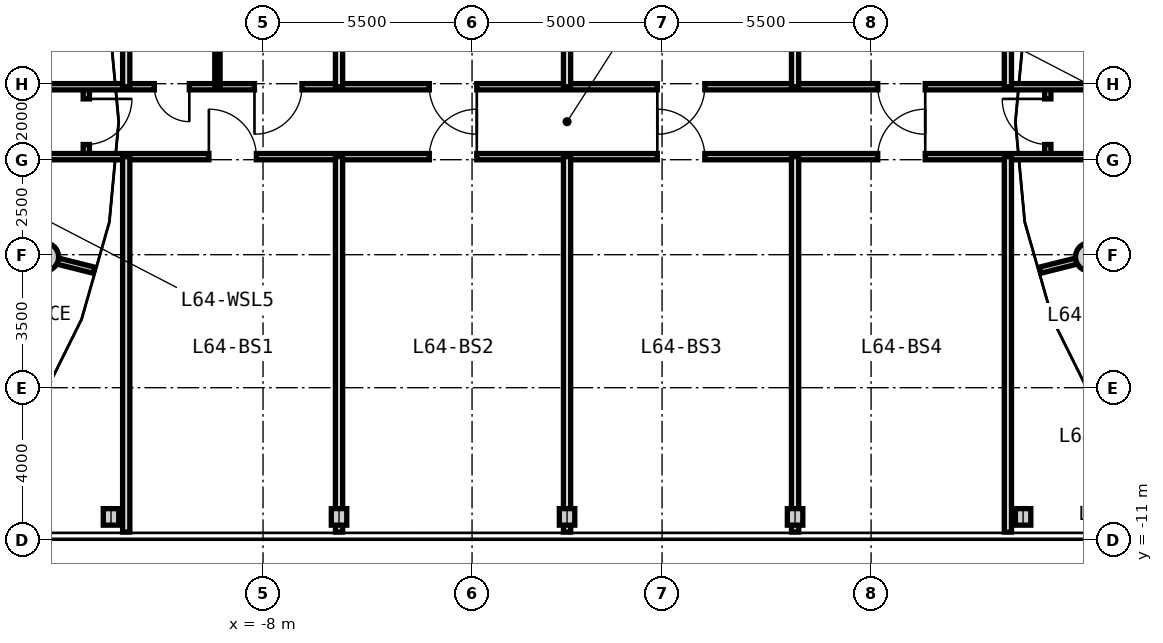
"""IFC4 building model, lengths in metres.
Left out: names, types, materials, properties, quantities, classifications, styles, units other than length and angle.
Written with IfcOpenShell. Run it as: python <this file> out.ifc"""

import sys

from ifc_helpers import new_model, si_unit, direction, frame, frame_2d, origin, origin_2d, place, context, subcontext, project, spatial, rectangle, circle, i_section, extrude, source, transform, mapped, element, fill, save


model = new_model("IFC4")
c1 = context("Model", 3, precision=1e-05, world=origin(), true_north=direction((0.0, 1.0)))
c2 = subcontext(c1, "Body", "Model", "MODEL_VIEW")
j1 = project(units=[si_unit("LENGTHUNIT", "METRE"), si_unit("PLANEANGLEUNIT", "RADIAN")], contexts=[c1])
p1 = place(None, origin())
s1 = spatial("IfcSite", under=j1, at=p1, CompositionType="ELEMENT")
p2 = place(p1, origin())
s2 = spatial("IfcBuilding", under=s1, at=p2, CompositionType="ELEMENT")
p3 = place(p2, frame((0.0, 0.0, 207.8)))
s3 = spatial("IfcBuildingStorey", under=s2, at=p3, CompositionType="ELEMENT", Elevation=207.8)
m1 = source(origin(), c2, "Body", "SweptSolid", [
    extrude(circle(Radius=0.375, at=origin_2d()), origin(), (0.0, 0.0, 1.0), 3.05),
])
for number, where, z_axis, x_axis in (
    (1, (-13.753, -3.559, 0.0), (0.0, 0.0, 1.0), (1.0, 0.0, 0.0)),
    (2, (13.753, -3.559, 0.0), (0.0, 0.0, 1.0), (1.0, 0.0, 0.0)),
):
    element("IfcColumn", number, at=place(p3, frame(where, z_axis=z_axis, x_axis=x_axis)), inside=s3, PredefinedType="COLUMN", context=c2, shape_type="MappedRepresentation", body=[
        mapped(m1, transform((0.0, 0.0, 0.0), x_axis=(1.0, 0.0, 0.0), y_axis=(0.0, 1.0, 0.0), z_axis=(0.0, 0.0, 1.0), scale=1.0)),
    ])
m2 = source(origin(), c2, "Body", "SweptSolid", [
    extrude(i_section(OverallWidth=0.407, OverallDepth=0.435, WebThickness=0.024, FlangeThickness=0.039, FilletRadius=0.015, at=origin_2d()), origin(), (0.0, 0.0, 1.0), 3.05),
])
for number, where, z_axis, x_axis in (
    (3, (-12.0, -10.4, 0.0), (0.0, 0.0, 1.0), (1.0, 0.0, 0.0)),
    (4, (-6.0, -10.4, 0.0), (0.0, 0.0, 1.0), (1.0, 0.0, 0.0)),
    (5, (0.0, -10.4, 0.0), (0.0, 0.0, 1.0), (1.0, 0.0, 0.0)),
    (6, (6.0, -10.4, 0.0), (0.0, 0.0, 1.0), (1.0, 0.0, 0.0)),
    (7, (12.0, -10.4, 0.0), (0.0, 0.0, 1.0), (1.0, 0.0, 0.0)),
):
    element("IfcColumn", number, at=place(p3, frame(where, z_axis=z_axis, x_axis=x_axis)), inside=s3, PredefinedType="COLUMN", context=c2, shape_type="MappedRepresentation", body=[
        mapped(m2, transform((0.0, 0.0, 0.0), x_axis=(1.0, 0.0, 0.0), y_axis=(0.0, 1.0, 0.0), z_axis=(0.0, 0.0, 1.0), scale=1.0)),
    ])
m3 = source(origin(), c2, "Body", "SweptSolid", [
    extrude(rectangle(XDim=6.157, YDim=0.165, at=frame_2d((3.079, 0.0))), origin(), (0.0, 0.0, 1.0), 2.345),
])
for number, where, z_axis, x_axis in (
    (8, (-18.42, -2.407, 0.0), (0.0, 0.0, 1.0), (0.97, -0.244, 0.0)),
    (9, (18.42, -2.407, 0.0), (0.0, 0.0, 1.0), (-0.97, -0.244, 0.0)),
):
    element("IfcWall", number, at=place(p3, frame(where, z_axis=z_axis, x_axis=x_axis)), inside=s3, PredefinedType="PARTITIONING", context=c2, shape_type="MappedRepresentation", body=[
        mapped(m3, transform((0.0, 0.0, 0.0), x_axis=(1.0, 0.0, 0.0), y_axis=(0.0, 1.0, 0.0), z_axis=(0.0, 0.0, 1.0), scale=1.0)),
    ])
m4 = source(origin(), c2, "Body", "SweptSolid", [
    extrude(rectangle(XDim=1.84, YDim=0.165, at=frame_2d((0.92, 0.0))), origin(), (0.0, 0.0, 1.0), 2.745),
])
p4 = place(p3, frame((-12.65, -0.92, 0.0), z_axis=(0.0, 0.0, 1.0), x_axis=(0.0, 1.0, 0.0)))
e10 = element("IfcWall", 10, at=p4, inside=s3, PredefinedType="PARTITIONING", context=c2, shape_type="MappedRepresentation", body=[
    mapped(m4, transform((0.0, 0.0, 0.0), x_axis=(1.0, 0.0, 0.0), y_axis=(0.0, 1.0, 0.0), z_axis=(0.0, 0.0, 1.0), scale=1.0)),
])
p5 = place(p4, frame((0.32, 0.0, 0.0)))
e11 = element("IfcOpeningElement", 11, at=p5, cuts=e10, PredefinedType="OPENING", context=c2, shape_type="SweptSolid", body=[
    extrude(rectangle(XDim=1.2, YDim=2.15, at=frame_2d((0.6, 1.075))), frame((0.0, 0.093, 0.0), z_axis=(0.0, -1.0, 0.0), x_axis=(1.0, 0.0, 0.0)), (0.0, 0.0, 1.0), 0.185),
])
p6 = place(p3, frame((12.65, -0.92, 0.0), z_axis=(0.0, 0.0, 1.0), x_axis=(0.0, 1.0, 0.0)))
e12 = element("IfcWall", 12, at=p6, inside=s3, PredefinedType="PARTITIONING", context=c2, shape_type="MappedRepresentation", body=[
    mapped(m4, transform((0.0, 0.0, 0.0), x_axis=(1.0, 0.0, 0.0), y_axis=(0.0, 1.0, 0.0), z_axis=(0.0, 0.0, 1.0), scale=1.0)),
])
p7 = place(p6, frame((0.32, 0.0, 0.0)))
e13 = element("IfcOpeningElement", 13, at=p7, cuts=e12, PredefinedType="OPENING", context=c2, shape_type="SweptSolid", body=[
    extrude(rectangle(XDim=1.2, YDim=2.15, at=frame_2d((0.6, 1.075))), frame((0.0, 0.093, 0.0), z_axis=(0.0, -1.0, 0.0), x_axis=(1.0, 0.0, 0.0)), (0.0, 0.0, 1.0), 0.185),
])
m5 = source(origin(), c2, "Body", "SweptSolid", [
    extrude(rectangle(XDim=37.0, YDim=0.165, at=frame_2d((18.5, 0.0))), origin(), (0.0, 0.0, 1.0), 2.745),
])
p8 = place(p3, frame((-18.5, -0.92, 0.0), z_axis=(0.0, 0.0, 1.0), x_axis=(1.0, 0.0, 0.0)))
e14 = element("IfcWall", 14, at=p8, inside=s3, PredefinedType="PARTITIONING", context=c2, shape_type="MappedRepresentation", body=[
    mapped(m5, transform((0.0, 0.0, 0.0), x_axis=(1.0, 0.0, 0.0), y_axis=(0.0, 1.0, 0.0), z_axis=(0.0, 0.0, 1.0), scale=1.0)),
])
p9 = place(p8, frame((2.662, 0.0, 0.0)))
e15 = element("IfcOpeningElement", 15, at=p9, cuts=e14, PredefinedType="OPENING", context=c2, shape_type="SweptSolid", body=[
    extrude(rectangle(XDim=0.95, YDim=2.1, at=frame_2d((0.475, 1.05))), frame((0.0, 0.093, 0.0), z_axis=(0.0, -1.0, 0.0), x_axis=(1.0, 0.0, 0.0)), (0.0, 0.0, 1.0), 0.185),
])
p10 = place(p8, frame((33.388, 0.0, 0.0)))
e16 = element("IfcOpeningElement", 16, at=p10, cuts=e14, PredefinedType="OPENING", context=c2, shape_type="SweptSolid", body=[
    extrude(rectangle(XDim=0.95, YDim=2.1, at=frame_2d((0.475, 1.05))), frame((0.0, 0.093, 0.0), z_axis=(0.0, -1.0, 0.0), x_axis=(1.0, 0.0, 0.0)), (0.0, 0.0, 1.0), 0.185),
])
p11 = place(p8, frame((9.075, 0.0, 0.0)))
e17 = element("IfcOpeningElement", 17, at=p11, cuts=e14, PredefinedType="OPENING", context=c2, shape_type="SweptSolid", body=[
    extrude(rectangle(XDim=1.25, YDim=2.2, at=frame_2d((0.625, 1.1))), frame((0.0, 0.093, 0.0), z_axis=(0.0, -1.0, 0.0), x_axis=(1.0, 0.0, 0.0)), (0.0, 0.0, 1.0), 0.185),
])
p12 = place(p8, frame((14.875, 0.0, 0.0)))
e18 = element("IfcOpeningElement", 18, at=p12, cuts=e14, PredefinedType="OPENING", context=c2, shape_type="SweptSolid", body=[
    extrude(rectangle(XDim=1.25, YDim=2.2, at=frame_2d((0.625, 1.1))), frame((0.0, 0.093, 0.0), z_axis=(0.0, -1.0, 0.0), x_axis=(1.0, 0.0, 0.0)), (0.0, 0.0, 1.0), 0.185),
])
p13 = place(p8, frame((20.875, 0.0, 0.0)))
e19 = element("IfcOpeningElement", 19, at=p13, cuts=e14, PredefinedType="OPENING", context=c2, shape_type="SweptSolid", body=[
    extrude(rectangle(XDim=1.25, YDim=2.2, at=frame_2d((0.625, 1.1))), frame((0.0, 0.093, 0.0), z_axis=(0.0, -1.0, 0.0), x_axis=(1.0, 0.0, 0.0)), (0.0, 0.0, 1.0), 0.185),
])
p14 = place(p8, frame((26.675, 0.0, 0.0)))
e20 = element("IfcOpeningElement", 20, at=p14, cuts=e14, PredefinedType="OPENING", context=c2, shape_type="SweptSolid", body=[
    extrude(rectangle(XDim=1.25, YDim=2.2, at=frame_2d((0.625, 1.1))), frame((0.0, 0.093, 0.0), z_axis=(0.0, -1.0, 0.0), x_axis=(1.0, 0.0, 0.0)), (0.0, 0.0, 1.0), 0.185),
])
p15 = place(p3, frame((-18.5, 0.92, 0.0), z_axis=(0.0, 0.0, 1.0), x_axis=(1.0, 0.0, 0.0)))
e21 = element("IfcWall", 21, at=p15, inside=s3, PredefinedType="PARTITIONING", context=c2, shape_type="MappedRepresentation", body=[
    mapped(m5, transform((0.0, 0.0, 0.0), x_axis=(1.0, 0.0, 0.0), y_axis=(0.0, 1.0, 0.0), z_axis=(0.0, 0.0, 1.0), scale=1.0)),
])
p16 = place(p15, frame((2.662, 0.0, 0.0)))
e22 = element("IfcOpeningElement", 22, at=p16, cuts=e21, PredefinedType="OPENING", context=c2, shape_type="SweptSolid", body=[
    extrude(rectangle(XDim=0.95, YDim=2.1, at=frame_2d((0.475, 1.05))), frame((0.0, 0.093, 0.0), z_axis=(0.0, -1.0, 0.0), x_axis=(1.0, 0.0, 0.0)), (0.0, 0.0, 1.0), 0.185),
])
p17 = place(p15, frame((33.388, 0.0, 0.0)))
e23 = element("IfcOpeningElement", 23, at=p17, cuts=e21, PredefinedType="OPENING", context=c2, shape_type="SweptSolid", body=[
    extrude(rectangle(XDim=0.95, YDim=2.1, at=frame_2d((0.475, 1.05))), frame((0.0, 0.093, 0.0), z_axis=(0.0, -1.0, 0.0), x_axis=(1.0, 0.0, 0.0)), (0.0, 0.0, 1.0), 0.185),
])
p18 = place(p15, frame((7.64, 0.0, 0.0)))
e24 = element("IfcOpeningElement", 24, at=p18, cuts=e21, PredefinedType="OPENING", context=c2, shape_type="SweptSolid", body=[
    extrude(rectangle(XDim=0.92, YDim=2.1, at=frame_2d((0.46, 1.05))), frame((0.0, 0.093, 0.0), z_axis=(0.0, -1.0, 0.0), x_axis=(1.0, 0.0, 0.0)), (0.0, 0.0, 1.0), 0.185),
])
p19 = place(p15, frame((10.275, 0.0, 0.0)))
e25 = element("IfcOpeningElement", 25, at=p19, cuts=e21, PredefinedType="OPENING", context=c2, shape_type="SweptSolid", body=[
    extrude(rectangle(XDim=1.25, YDim=2.2, at=frame_2d((0.625, 1.1))), frame((0.0, 0.093, 0.0), z_axis=(0.0, -1.0, 0.0), x_axis=(1.0, 0.0, 0.0)), (0.0, 0.0, 1.0), 0.185),
])
p20 = place(p15, frame((14.875, 0.0, 0.0)))
e26 = element("IfcOpeningElement", 26, at=p20, cuts=e21, PredefinedType="OPENING", context=c2, shape_type="SweptSolid", body=[
    extrude(rectangle(XDim=1.25, YDim=2.2, at=frame_2d((0.625, 1.1))), frame((0.0, 0.093, 0.0), z_axis=(0.0, -1.0, 0.0), x_axis=(1.0, 0.0, 0.0)), (0.0, 0.0, 1.0), 0.185),
])
p21 = place(p15, frame((20.875, 0.0, 0.0)))
e27 = element("IfcOpeningElement", 27, at=p21, cuts=e21, PredefinedType="OPENING", context=c2, shape_type="SweptSolid", body=[
    extrude(rectangle(XDim=1.25, YDim=2.2, at=frame_2d((0.625, 1.1))), frame((0.0, 0.093, 0.0), z_axis=(0.0, -1.0, 0.0), x_axis=(1.0, 0.0, 0.0)), (0.0, 0.0, 1.0), 0.185),
])
p22 = place(p15, frame((26.675, 0.0, 0.0)))
e28 = element("IfcOpeningElement", 28, at=p22, cuts=e21, PredefinedType="OPENING", context=c2, shape_type="SweptSolid", body=[
    extrude(rectangle(XDim=1.25, YDim=2.2, at=frame_2d((0.625, 1.1))), frame((0.0, 0.093, 0.0), z_axis=(0.0, -1.0, 0.0), x_axis=(1.0, 0.0, 0.0)), (0.0, 0.0, 1.0), 0.185),
])
m6 = source(origin(), c2, "Body", "SweptSolid", [
    extrude(rectangle(XDim=9.88, YDim=0.19, at=frame_2d((4.94, 0.0))), origin(), (0.0, 0.0, 1.0), 2.745),
])
for number, where, z_axis, x_axis in (
    (29, (-11.6, -10.8, 0.0), (0.0, 0.0, 1.0), (0.0, 1.0, 0.0)),
    (30, (-11.6, 0.92, 0.0), (0.0, 0.0, 1.0), (0.0, 1.0, 0.0)),
    (31, (11.6, -10.8, 0.0), (0.0, 0.0, 1.0), (0.0, 1.0, 0.0)),
    (32, (11.6, 0.92, 0.0), (0.0, 0.0, 1.0), (0.0, 1.0, 0.0)),
):
    element("IfcWall", number, at=place(p3, frame(where, z_axis=z_axis, x_axis=x_axis)), inside=s3, PredefinedType="PARTITIONING", context=c2, shape_type="MappedRepresentation", body=[
        mapped(m6, transform((0.0, 0.0, 0.0), x_axis=(1.0, 0.0, 0.0), y_axis=(0.0, 1.0, 0.0), z_axis=(0.0, 0.0, 1.0), scale=1.0)),
    ])
m7 = source(origin(), c2, "Body", "SweptSolid", [
    extrude(rectangle(XDim=9.88, YDim=0.19, at=frame_2d((4.94, 0.0))), origin(), (0.0, 0.0, 1.0), 2.045),
])
for number, where, z_axis, x_axis in (
    (33, (-6.0, -10.8, 0.0), (0.0, 0.0, 1.0), (0.0, 1.0, 0.0)),
    (34, (-6.0, 0.92, 0.0), (0.0, 0.0, 1.0), (0.0, 1.0, 0.0)),
):
    element("IfcWall", number, at=place(p3, frame(where, z_axis=z_axis, x_axis=x_axis)), inside=s3, PredefinedType="PARTITIONING", context=c2, shape_type="MappedRepresentation", body=[
        mapped(m7, transform((0.0, 0.0, 0.0), x_axis=(1.0, 0.0, 0.0), y_axis=(0.0, 1.0, 0.0), z_axis=(0.0, 0.0, 1.0), scale=1.0)),
    ])
m8 = source(origin(), c2, "Body", "SweptSolid", [
    extrude(rectangle(XDim=9.88, YDim=0.14, at=frame_2d((4.94, 0.0))), origin(), (0.0, 0.0, 1.0), 2.745),
])
p23 = place(p3, frame((-9.2, 0.92, 0.0), z_axis=(0.0, 0.0, 1.0), x_axis=(0.0, 1.0, 0.0)))
e35 = element("IfcWall", 35, at=p23, inside=s3, PredefinedType="PARTITIONING", context=c2, shape_type="MappedRepresentation", body=[
    mapped(m8, transform((0.0, 0.0, 0.0), x_axis=(1.0, 0.0, 0.0), y_axis=(0.0, 1.0, 0.0), z_axis=(0.0, 0.0, 1.0), scale=1.0)),
])
for number, where, z_axis, x_axis in (
    (36, (0.0, -10.8, 0.0), (0.0, 0.0, 1.0), (0.0, 1.0, 0.0)),
    (37, (0.0, 0.92, 0.0), (0.0, 0.0, 1.0), (0.0, 1.0, 0.0)),
    (38, (6.0, -10.8, 0.0), (0.0, 0.0, 1.0), (0.0, 1.0, 0.0)),
    (39, (6.0, 0.92, 0.0), (0.0, 0.0, 1.0), (0.0, 1.0, 0.0)),
):
    element("IfcWall", number, at=place(p3, frame(where, z_axis=z_axis, x_axis=x_axis)), inside=s3, PredefinedType="PARTITIONING", context=c2, shape_type="MappedRepresentation", body=[
        mapped(m7, transform((0.0, 0.0, 0.0), x_axis=(1.0, 0.0, 0.0), y_axis=(0.0, 1.0, 0.0), z_axis=(0.0, 0.0, 1.0), scale=1.0)),
    ])
m9 = source(origin(), c2, "Body", "SweptSolid", [
    extrude(rectangle(XDim=1.2, YDim=2.15, at=frame_2d((0.6, 1.075))), frame((0.0, 0.025, 0.0), z_axis=(0.0, -1.0, 0.0), x_axis=(1.0, 0.0, 0.0)), (0.0, 0.0, 1.0), 0.05),
])
p24 = place(p5, frame((1.2, 0.0, 0.0), z_axis=(0.0, 0.0, 1.0), x_axis=(-1.0, 0.0, 0.0)))
e40 = element("IfcDoor", 40, at=p24, inside=s3, OperationType="SINGLE_SWING_LEFT", PredefinedType="DOOR", context=c2, shape_type="MappedRepresentation", body=[
    mapped(m9, transform((0.0, 0.0, 0.0), x_axis=(1.0, 0.0, 0.0), y_axis=(0.0, 1.0, 0.0), z_axis=(0.0, 0.0, 1.0), scale=1.0)),
])
fill(e11, e40)
p25 = place(p7, origin())
e41 = element("IfcDoor", 41, at=p25, inside=s3, OperationType="SINGLE_SWING_RIGHT", PredefinedType="DOOR", context=c2, shape_type="MappedRepresentation", body=[
    mapped(m9, transform((0.0, 0.0, 0.0), x_axis=(1.0, 0.0, 0.0), y_axis=(0.0, 1.0, 0.0), z_axis=(0.0, 0.0, 1.0), scale=1.0)),
])
fill(e13, e41)
m10 = source(origin(), c2, "Body", "SweptSolid", [
    extrude(rectangle(XDim=1.25, YDim=2.2, at=frame_2d((0.625, 1.1))), frame((0.0, 0.025, 0.0), z_axis=(0.0, -1.0, 0.0), x_axis=(1.0, 0.0, 0.0)), (0.0, 0.0, 1.0), 0.05),
])
p26 = place(p11, origin())
e42 = element("IfcDoor", 42, at=p26, inside=s3, OperationType="SINGLE_SWING_LEFT", PredefinedType="DOOR", context=c2, shape_type="MappedRepresentation", body=[
    mapped(m10, transform((0.0, 0.0, 0.0), x_axis=(1.0, 0.0, 0.0), y_axis=(0.0, 1.0, 0.0), z_axis=(0.0, 0.0, 1.0), scale=1.0)),
])
fill(e17, e42)
m11 = source(origin(), c2, "Body", "SweptSolid", [
    extrude(rectangle(XDim=0.92, YDim=2.1, at=frame_2d((0.46, 1.05))), frame((0.0, 0.025, 0.0), z_axis=(0.0, -1.0, 0.0), x_axis=(1.0, 0.0, 0.0)), (0.0, 0.0, 1.0), 0.05),
])
p27 = place(p18, frame((0.92, 0.0, 0.0), z_axis=(0.0, 0.0, 1.0), x_axis=(-1.0, 0.0, 0.0)))
e43 = element("IfcDoor", 43, at=p27, inside=s3, OperationType="SINGLE_SWING_LEFT", PredefinedType="DOOR", context=c2, shape_type="MappedRepresentation", body=[
    mapped(m11, transform((0.0, 0.0, 0.0), x_axis=(1.0, 0.0, 0.0), y_axis=(0.0, 1.0, 0.0), z_axis=(0.0, 0.0, 1.0), scale=1.0)),
])
fill(e24, e43)
p28 = place(p19, frame((1.25, 0.0, 0.0), z_axis=(0.0, 0.0, 1.0), x_axis=(-1.0, 0.0, 0.0)))
e44 = element("IfcDoor", 44, at=p28, inside=s3, OperationType="SINGLE_SWING_RIGHT", PredefinedType="DOOR", context=c2, shape_type="MappedRepresentation", body=[
    mapped(m10, transform((0.0, 0.0, 0.0), x_axis=(1.0, 0.0, 0.0), y_axis=(0.0, 1.0, 0.0), z_axis=(0.0, 0.0, 1.0), scale=1.0)),
])
fill(e25, e44)
p29 = place(p12, origin())
e45 = element("IfcDoor", 45, at=p29, inside=s3, OperationType="SINGLE_SWING_RIGHT", PredefinedType="DOOR", context=c2, shape_type="MappedRepresentation", body=[
    mapped(m10, transform((0.0, 0.0, 0.0), x_axis=(1.0, 0.0, 0.0), y_axis=(0.0, 1.0, 0.0), z_axis=(0.0, 0.0, 1.0), scale=1.0)),
])
fill(e18, e45)
p30 = place(p20, frame((1.25, 0.0, 0.0), z_axis=(0.0, 0.0, 1.0), x_axis=(-1.0, 0.0, 0.0)))
e46 = element("IfcDoor", 46, at=p30, inside=s3, OperationType="SINGLE_SWING_LEFT", PredefinedType="DOOR", context=c2, shape_type="MappedRepresentation", body=[
    mapped(m10, transform((0.0, 0.0, 0.0), x_axis=(1.0, 0.0, 0.0), y_axis=(0.0, 1.0, 0.0), z_axis=(0.0, 0.0, 1.0), scale=1.0)),
])
fill(e26, e46)
p31 = place(p13, origin())
e47 = element("IfcDoor", 47, at=p31, inside=s3, OperationType="SINGLE_SWING_LEFT", PredefinedType="DOOR", context=c2, shape_type="MappedRepresentation", body=[
    mapped(m10, transform((0.0, 0.0, 0.0), x_axis=(1.0, 0.0, 0.0), y_axis=(0.0, 1.0, 0.0), z_axis=(0.0, 0.0, 1.0), scale=1.0)),
])
fill(e19, e47)
p32 = place(p21, frame((1.25, 0.0, 0.0), z_axis=(0.0, 0.0, 1.0), x_axis=(-1.0, 0.0, 0.0)))
e48 = element("IfcDoor", 48, at=p32, inside=s3, OperationType="SINGLE_SWING_RIGHT", PredefinedType="DOOR", context=c2, shape_type="MappedRepresentation", body=[
    mapped(m10, transform((0.0, 0.0, 0.0), x_axis=(1.0, 0.0, 0.0), y_axis=(0.0, 1.0, 0.0), z_axis=(0.0, 0.0, 1.0), scale=1.0)),
])
fill(e27, e48)
p33 = place(p14, origin())
e49 = element("IfcDoor", 49, at=p33, inside=s3, OperationType="SINGLE_SWING_RIGHT", PredefinedType="DOOR", context=c2, shape_type="MappedRepresentation", body=[
    mapped(m10, transform((0.0, 0.0, 0.0), x_axis=(1.0, 0.0, 0.0), y_axis=(0.0, 1.0, 0.0), z_axis=(0.0, 0.0, 1.0), scale=1.0)),
])
fill(e20, e49)
p34 = place(p22, frame((1.25, 0.0, 0.0), z_axis=(0.0, 0.0, 1.0), x_axis=(-1.0, 0.0, 0.0)))
e50 = element("IfcDoor", 50, at=p34, inside=s3, OperationType="SINGLE_SWING_LEFT", PredefinedType="DOOR", context=c2, shape_type="MappedRepresentation", body=[
    mapped(m10, transform((0.0, 0.0, 0.0), x_axis=(1.0, 0.0, 0.0), y_axis=(0.0, 1.0, 0.0), z_axis=(0.0, 0.0, 1.0), scale=1.0)),
])
fill(e28, e50)
save(model, sys.argv[1])
